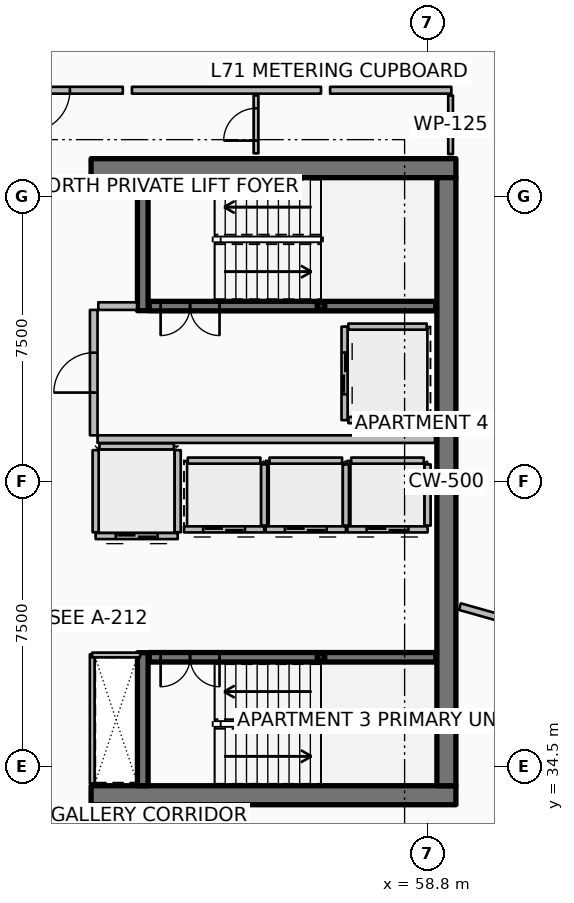
"""IFC4 building model, lengths in metres.
Left out: names, types, materials, properties, quantities, classifications, styles, units other than length and angle.
Written with IfcOpenShell. Run it as: python <this file> out.ifc"""

import sys

from ifc_helpers import new_model, si_unit, direction, frame, frame_2d, origin, origin_2d, place, context, subcontext, project, spatial, rectangle, hollow_rectangle, extrude, element, fill, save


model = new_model("IFC4")
c1 = context("Model", 3, precision=1e-05, world=origin(), true_north=direction((0.0, 1.0)))
c2 = subcontext(c1, "Body", "Model", "MODEL_VIEW")
j1 = project(units=[si_unit("LENGTHUNIT", "METRE"), si_unit("PLANEANGLEUNIT", "RADIAN")], contexts=[c1])
p1 = place(None, origin())
s1 = spatial("IfcSite", under=j1, at=p1, CompositionType="ELEMENT")
p2 = place(p1, origin())
s2 = spatial("IfcBuilding", under=s1, at=p2, CompositionType="ELEMENT")
p3 = place(p2, frame((0.0, 0.0, 282.9)))
s3 = spatial("IfcBuildingStorey", under=s2, at=p3, CompositionType="ELEMENT", Elevation=282.9)
for number, where, z_axis, x_axis in (
    (1, (49.95, 33.75, 0.0), (0.0, 0.0, 1.0), (1.0, 0.0, 0.0)),
    (2, (49.95, 50.25, 0.0), (0.0, 0.0, 1.0), (1.0, 0.0, 0.0)),
):
    element("IfcWall", number, at=place(p3, frame(where, z_axis=z_axis, x_axis=x_axis)), inside=s3, PredefinedType="SHEAR", context=c2, shape_type="SweptSolid", body=[
        extrude(rectangle(XDim=9.6, YDim=0.5, at=frame_2d((4.8, 0.0))), origin(), (0.0, 0.0, 1.0), 3.85),
    ])
p4 = place(p3, frame((59.3, 34.0, 0.0), z_axis=(0.0, 0.0, 1.0), x_axis=(0.0, 1.0, 0.0)))
e3 = element("IfcWall", 3, at=p4, inside=s3, PredefinedType="SHEAR", context=c2, shape_type="SweptSolid", body=[
    extrude(rectangle(XDim=16.0, YDim=0.5, at=frame_2d((8.0, 0.0))), origin(), (0.0, 0.0, 1.0), 3.85),
])
for number, where, z_axis, x_axis in (
    (4, (51.31, 46.5, 0.0), (0.0, 0.0, 1.0), (0.0, 1.0, 0.0)),
    (5, (51.31, 34.0, 0.0), (0.0, 0.0, 1.0), (0.0, 1.0, 0.0)),
):
    element("IfcWall", number, at=place(p3, frame(where, z_axis=z_axis, x_axis=x_axis)), inside=s3, PredefinedType="SHEAR", context=c2, shape_type="SweptSolid", body=[
        extrude(rectangle(XDim=3.5, YDim=0.28, at=frame_2d((1.75, 0.0))), origin(), (0.0, 0.0, 1.0), 3.85),
    ])
for number, where, z_axis, x_axis in (
    (6, (56.0, 46.62, 0.0), (0.0, 0.0, 1.0), (1.0, 0.0, 0.0)),
    (7, (56.0, 37.38, 0.0), (0.0, 0.0, 1.0), (1.0, 0.0, 0.0)),
):
    element("IfcColumn", number, at=place(p3, frame(where, z_axis=z_axis, x_axis=x_axis)), inside=s3, PredefinedType="COLUMN", context=c2, shape_type="SweptSolid", body=[
        extrude(hollow_rectangle(XDim=0.2, YDim=0.2, WallThickness=0.01, InnerFilletRadius=0.01, OuterFilletRadius=0.02, at=origin_2d()), origin(), (0.0, 0.0, 1.0), 1.72),
    ])
p5 = place(p3, frame((51.48, 46.62, 0.0), z_axis=(0.0, 0.0, 1.0), x_axis=(1.0, 0.0, 0.0)))
e8 = element("IfcWall", 8, at=p5, inside=s3, PredefinedType="SOLIDWALL", context=c2, shape_type="SweptSolid", body=[
    extrude(rectangle(XDim=7.54, YDim=0.25, at=frame_2d((3.77, 0.0))), origin(), (0.0, 0.0, 1.0), 3.59),
])
p6 = place(p5, frame((0.3, 0.0, 0.0)))
e9 = element("IfcOpeningElement", 9, at=p6, cuts=e8, PredefinedType="OPENING", context=c2, shape_type="SweptSolid", body=[
    extrude(rectangle(XDim=1.55, YDim=2.15, at=frame_2d((0.775, 1.075))), frame((0.0, 0.135, 0.0), z_axis=(0.0, -1.0, 0.0), x_axis=(1.0, 0.0, 0.0)), (0.0, 0.0, 1.0), 0.27),
])
p7 = place(p3, frame((51.48, 37.38, 0.0), z_axis=(0.0, 0.0, 1.0), x_axis=(1.0, 0.0, 0.0)))
e10 = element("IfcWall", 10, at=p7, inside=s3, PredefinedType="SOLIDWALL", context=c2, shape_type="SweptSolid", body=[
    extrude(rectangle(XDim=7.54, YDim=0.25, at=frame_2d((3.77, 0.0))), origin(), (0.0, 0.0, 1.0), 3.59),
])
p8 = place(p7, frame((0.3, 0.0, 0.0)))
e11 = element("IfcOpeningElement", 11, at=p8, cuts=e10, PredefinedType="OPENING", context=c2, shape_type="SweptSolid", body=[
    extrude(rectangle(XDim=1.55, YDim=2.15, at=frame_2d((0.775, 1.075))), frame((0.0, 0.135, 0.0), z_axis=(0.0, -1.0, 0.0), x_axis=(1.0, 0.0, 0.0)), (0.0, 0.0, 1.0), 0.27),
])
p9 = place(p3, frame((54.505, 40.745, 0.0), z_axis=(0.0, 0.0, 1.0), x_axis=(-1.0, 0.0, 0.0)))
e12 = element("IfcWall", 12, at=p9, inside=s3, PredefinedType="PARTITIONING", context=c2, shape_type="SweptSolid", body=[
    extrude(rectangle(XDim=2.11, YDim=0.16, at=frame_2d((1.055, 0.0))), origin(), (0.0, 0.0, 1.0), 3.59),
])
p10 = place(p9, frame((0.505, 0.0, 0.0)))
e13 = element("IfcOpeningElement", 13, at=p10, cuts=e12, PredefinedType="OPENING", context=c2, shape_type="SweptSolid", body=[
    extrude(rectangle(XDim=1.1, YDim=2.1, at=frame_2d((0.55, 1.05))), frame((0.0, 0.09, 0.0), z_axis=(0.0, -1.0, 0.0), x_axis=(1.0, 0.0, 0.0)), (0.0, 0.0, 1.0), 0.18),
])
p11 = place(p3, frame((54.505, 40.845, 0.0), z_axis=(0.0, 0.0, 1.0), x_axis=(0.0, 1.0, 0.0)))
e14 = element("IfcWall", 14, at=p11, inside=s3, PredefinedType="PARTITIONING", context=c2, shape_type="SweptSolid", body=[
    extrude(rectangle(XDim=1.61, YDim=0.16, at=frame_2d((0.805, 0.0))), origin(), (0.0, 0.0, 1.0), 3.59),
])
p12 = place(p3, frame((52.495, 42.555, 0.0), z_axis=(0.0, 0.0, 1.0), x_axis=(1.0, 0.0, 0.0)))
e15 = element("IfcWall", 15, at=p12, inside=s3, PredefinedType="PARTITIONING", context=c2, shape_type="SweptSolid", body=[
    extrude(rectangle(XDim=1.91, YDim=0.16, at=frame_2d((0.955, 0.0))), origin(), (0.0, 0.0, 1.0), 3.59),
])
p13 = place(p3, frame((56.655, 40.745, 0.0), z_axis=(0.0, 0.0, 1.0), x_axis=(-1.0, 0.0, 0.0)))
e16 = element("IfcWall", 16, at=p13, inside=s3, PredefinedType="PARTITIONING", context=c2, shape_type="SweptSolid", body=[
    extrude(rectangle(XDim=2.11, YDim=0.16, at=frame_2d((1.055, 0.0))), origin(), (0.0, 0.0, 1.0), 3.59),
])
p14 = place(p13, frame((0.505, 0.0, 0.0)))
e17 = element("IfcOpeningElement", 17, at=p14, cuts=e16, PredefinedType="OPENING", context=c2, shape_type="SweptSolid", body=[
    extrude(rectangle(XDim=1.1, YDim=2.1, at=frame_2d((0.55, 1.05))), frame((0.0, 0.09, 0.0), z_axis=(0.0, -1.0, 0.0), x_axis=(1.0, 0.0, 0.0)), (0.0, 0.0, 1.0), 0.18),
])
p15 = place(p3, frame((56.655, 40.845, 0.0), z_axis=(0.0, 0.0, 1.0), x_axis=(0.0, 1.0, 0.0)))
e18 = element("IfcWall", 18, at=p15, inside=s3, PredefinedType="PARTITIONING", context=c2, shape_type="SweptSolid", body=[
    extrude(rectangle(XDim=1.61, YDim=0.16, at=frame_2d((0.805, 0.0))), origin(), (0.0, 0.0, 1.0), 3.59),
])
p16 = place(p3, frame((54.645, 42.555, 0.0), z_axis=(0.0, 0.0, 1.0), x_axis=(1.0, 0.0, 0.0)))
e19 = element("IfcWall", 19, at=p16, inside=s3, PredefinedType="PARTITIONING", context=c2, shape_type="SweptSolid", body=[
    extrude(rectangle(XDim=1.91, YDim=0.16, at=frame_2d((0.955, 0.0))), origin(), (0.0, 0.0, 1.0), 3.59),
])
p17 = place(p3, frame((58.805, 40.745, 0.0), z_axis=(0.0, 0.0, 1.0), x_axis=(-1.0, 0.0, 0.0)))
e20 = element("IfcWall", 20, at=p17, inside=s3, PredefinedType="PARTITIONING", context=c2, shape_type="SweptSolid", body=[
    extrude(rectangle(XDim=2.11, YDim=0.16, at=frame_2d((1.055, 0.0))), origin(), (0.0, 0.0, 1.0), 3.59),
])
p18 = place(p17, frame((0.505, 0.0, 0.0)))
e21 = element("IfcOpeningElement", 21, at=p18, cuts=e20, PredefinedType="OPENING", context=c2, shape_type="SweptSolid", body=[
    extrude(rectangle(XDim=1.1, YDim=2.1, at=frame_2d((0.55, 1.05))), frame((0.0, 0.09, 0.0), z_axis=(0.0, -1.0, 0.0), x_axis=(1.0, 0.0, 0.0)), (0.0, 0.0, 1.0), 0.18),
])
p19 = place(p3, frame((58.805, 40.845, 0.0), z_axis=(0.0, 0.0, 1.0), x_axis=(0.0, 1.0, 0.0)))
e22 = element("IfcWall", 22, at=p19, inside=s3, PredefinedType="PARTITIONING", context=c2, shape_type="SweptSolid", body=[
    extrude(rectangle(XDim=1.61, YDim=0.16, at=frame_2d((0.805, 0.0))), origin(), (0.0, 0.0, 1.0), 3.59),
])
p20 = place(p3, frame((56.795, 42.555, 0.0), z_axis=(0.0, 0.0, 1.0), x_axis=(1.0, 0.0, 0.0)))
e23 = element("IfcWall", 23, at=p20, inside=s3, PredefinedType="PARTITIONING", context=c2, shape_type="SweptSolid", body=[
    extrude(rectangle(XDim=1.91, YDim=0.16, at=frame_2d((0.955, 0.0))), origin(), (0.0, 0.0, 1.0), 3.59),
])
p21 = place(p3, frame((56.62, 46.08, 0.0), z_axis=(0.0, 0.0, 1.0), x_axis=(0.0, -1.0, 0.0)))
e24 = element("IfcWall", 24, at=p21, inside=s3, PredefinedType="PARTITIONING", context=c2, shape_type="SweptSolid", body=[
    extrude(rectangle(XDim=2.46, YDim=0.16, at=frame_2d((1.23, 0.0))), origin(), (0.0, 0.0, 1.0), 3.59),
])
p22 = place(p21, frame((0.68, 0.0, 0.0)))
e25 = element("IfcOpeningElement", 25, at=p22, cuts=e24, PredefinedType="OPENING", context=c2, shape_type="SweptSolid", body=[
    extrude(rectangle(XDim=1.1, YDim=2.1, at=frame_2d((0.55, 1.05))), frame((0.0, 0.09, 0.0), z_axis=(0.0, -1.0, 0.0), x_axis=(1.0, 0.0, 0.0)), (0.0, 0.0, 1.0), 0.18),
])
for number, where, z_axis, x_axis in (
    (26, (56.72, 46.08, 0.0), (0.0, 0.0, 1.0), (1.0, 0.0, 0.0)),
    (27, (56.72, 43.62, 0.0), (0.0, 0.0, 1.0), (1.0, 0.0, 0.0)),
):
    element("IfcWall", number, at=place(p3, frame(where, z_axis=z_axis, x_axis=x_axis)), inside=s3, PredefinedType="PARTITIONING", context=c2, shape_type="SweptSolid", body=[
        extrude(rectangle(XDim=2.06, YDim=0.16, at=frame_2d((1.03, 0.0))), origin(), (0.0, 0.0, 1.0), 3.59),
    ])
p23 = place(p3, frame((52.23, 40.57, 0.0), z_axis=(0.0, 0.0, 1.0), x_axis=(-1.0, 0.0, 0.0)))
e28 = element("IfcWall", 28, at=p23, inside=s3, PredefinedType="PARTITIONING", context=c2, shape_type="SweptSolid", body=[
    extrude(rectangle(XDim=2.16, YDim=0.16, at=frame_2d((1.08, 0.0))), origin(), (0.0, 0.0, 1.0), 3.59),
])
p24 = place(p23, frame((0.53, 0.0, 0.0)))
e29 = element("IfcOpeningElement", 29, at=p24, cuts=e28, PredefinedType="OPENING", context=c2, shape_type="SweptSolid", body=[
    extrude(rectangle(XDim=1.1, YDim=2.1, at=frame_2d((0.55, 1.05))), frame((0.0, 0.09, 0.0), z_axis=(0.0, -1.0, 0.0), x_axis=(1.0, 0.0, 0.0)), (0.0, 0.0, 1.0), 0.18),
])
for number, where, z_axis, x_axis in (
    (30, (52.23, 40.67, 0.0), (0.0, 0.0, 1.0), (0.0, 1.0, 0.0)),
    (31, (50.07, 40.67, 0.0), (0.0, 0.0, 1.0), (0.0, 1.0, 0.0)),
):
    element("IfcWall", number, at=place(p3, frame(where, z_axis=z_axis, x_axis=x_axis)), inside=s3, PredefinedType="PARTITIONING", context=c2, shape_type="SweptSolid", body=[
        extrude(rectangle(XDim=2.16, YDim=0.16, at=frame_2d((1.08, 0.0))), origin(), (0.0, 0.0, 1.0), 3.59),
    ])
p25 = place(p3, frame((50.17, 42.93, 0.0), z_axis=(0.0, 0.0, 1.0), x_axis=(1.0, 0.0, 0.0)))
e32 = element("IfcWall", 32, at=p25, inside=s3, PredefinedType="PARTITIONING", context=c2, shape_type="SweptSolid", body=[
    extrude(rectangle(XDim=1.96, YDim=0.16, at=frame_2d((0.98, 0.0))), origin(), (0.0, 0.0, 1.0), 3.59),
])
p26 = place(p3, frame((50.12, 43.12, 0.0), z_axis=(0.0, 0.0, 1.0), x_axis=(1.0, 0.0, 0.0)))
e33 = element("IfcWall", 33, at=p26, inside=s3, PredefinedType="PARTITIONING", context=c2, shape_type="SweptSolid", body=[
    extrude(rectangle(XDim=8.88, YDim=0.2, at=frame_2d((4.44, 0.0))), origin(), (0.0, 0.0, 1.0), 3.59),
])
p27 = place(p3, frame((50.14, 46.62, 0.0), z_axis=(0.0, 0.0, 1.0), x_axis=(1.0, 0.0, 0.0)))
e34 = element("IfcWall", 34, at=p27, inside=s3, PredefinedType="PARTITIONING", context=c2, shape_type="SweptSolid", body=[
    extrude(rectangle(XDim=1.02, YDim=0.2, at=frame_2d((0.51, 0.0))), origin(), (0.0, 0.0, 1.0), 3.59),
])
p28 = place(p3, frame((50.02, 43.22, 0.0), z_axis=(0.0, 0.0, 1.0), x_axis=(0.0, 1.0, 0.0)))
e35 = element("IfcWall", 35, at=p28, inside=s3, PredefinedType="PARTITIONING", context=c2, shape_type="SweptSolid", body=[
    extrude(rectangle(XDim=3.3, YDim=0.2, at=frame_2d((1.65, 0.0))), origin(), (0.0, 0.0, 1.0), 3.59),
])
p29 = place(p28, frame((1.125, 0.0, 0.0)))
e36 = element("IfcOpeningElement", 36, at=p29, cuts=e35, PredefinedType="OPENING", context=c2, shape_type="SweptSolid", body=[
    extrude(rectangle(XDim=1.05, YDim=2.1, at=frame_2d((0.525, 1.05))), frame((0.0, 0.11, 0.0), z_axis=(0.0, -1.0, 0.0), x_axis=(1.0, 0.0, 0.0)), (0.0, 0.0, 1.0), 0.22),
])
p30 = place(p3, frame((49.98, 34.06, 0.0), z_axis=(0.0, 0.0, 1.0), x_axis=(0.0, 1.0, 0.0)))
e37 = element("IfcWall", 37, at=p30, inside=s3, PredefinedType="PARTITIONING", context=c2, shape_type="SweptSolid", body=[
    extrude(rectangle(XDim=3.4, YDim=0.125, at=frame_2d((1.7, 0.0))), origin(), (0.0, 0.0, 1.0), 3.03),
])
p31 = place(p3, frame((49.98, 37.44, 0.0), z_axis=(0.0, 0.0, 1.0), x_axis=(1.0, 0.0, 0.0)))
e38 = element("IfcWall", 38, at=p31, inside=s3, PredefinedType="PARTITIONING", context=c2, shape_type="SweptSolid", body=[
    extrude(rectangle(XDim=1.26, YDim=0.125, at=frame_2d((0.63, 0.0))), origin(), (0.0, 0.0, 1.0), 3.03),
])
p32 = place(p3, frame((59.41, 50.62, 0.0), z_axis=(0.0, 0.0, 1.0), x_axis=(0.0, 1.0, 0.0)))
e39 = element("IfcWall", 39, at=p32, inside=s3, PredefinedType="PARTITIONING", context=c2, shape_type="SweptSolid", body=[
    extrude(rectangle(XDim=1.54, YDim=0.125, at=frame_2d((0.77, 0.0))), origin(), (0.0, 0.0, 1.0), 3.03),
])
p33 = place(p3, frame((54.29, 50.64, 0.0), z_axis=(0.0, 0.0, 1.0), x_axis=(0.0, 1.0, 0.0)))
e40 = element("IfcWall", 40, at=p33, inside=s3, PredefinedType="PARTITIONING", context=c2, shape_type="SweptSolid", body=[
    extrude(rectangle(XDim=1.52, YDim=0.125, at=frame_2d((0.76, 0.0))), origin(), (0.0, 0.0, 1.0), 3.03),
])
p34 = place(p33, frame((0.335, 0.0, 0.0)))
e41 = element("IfcOpeningElement", 41, at=p34, cuts=e40, PredefinedType="OPENING", context=c2, shape_type="SweptSolid", body=[
    extrude(rectangle(XDim=0.85, YDim=2.06, at=frame_2d((0.425, 1.03))), frame((0.0, 0.073, 0.0), z_axis=(0.0, -1.0, 0.0), x_axis=(1.0, 0.0, 0.0)), (0.0, 0.0, 1.0), 0.145),
])
p35 = place(p3, frame((59.656, 38.713, 0.0), z_axis=(0.0, 0.0, 1.0), x_axis=(0.962454756022, -0.27144215334, 0.0)))
e42 = element("IfcWall", 42, at=p35, inside=s3, PredefinedType="PARTITIONING", context=c2, shape_type="SweptSolid", body=[
    extrude(rectangle(XDim=17.385, YDim=0.18, at=frame_2d((8.692, 0.0))), origin(), (0.0, 0.0, 1.0), 2.957),
])
p36 = place(p3, frame((50.785, 52.3, 0.0), z_axis=(0.0, 0.0, 1.0), x_axis=(-1.0, 0.0, 0.0)))
e43 = element("IfcWall", 43, at=p36, inside=s3, PredefinedType="PARTITIONING", context=c2, shape_type="SweptSolid", body=[
    extrude(rectangle(XDim=3.884, YDim=0.18, at=frame_2d((1.942, 0.0))), origin(), (0.0, 0.0, 1.0), 2.957),
])
p37 = place(p36, frame((1.392, 0.0, 0.0)))
e44 = element("IfcOpeningElement", 44, at=p37, cuts=e43, PredefinedType="OPENING", context=c2, shape_type="SweptSolid", body=[
    extrude(rectangle(XDim=1.1, YDim=2.1, at=frame_2d((0.55, 1.05))), frame((0.0, 0.1, 0.0), z_axis=(0.0, -1.0, 0.0), x_axis=(1.0, 0.0, 0.0)), (0.0, 0.0, 1.0), 0.2),
])
p38 = place(p3, frame((59.43, 52.3, 0.0), z_axis=(0.0, 0.0, 1.0), x_axis=(-1.0, 0.0, 0.0)))
e45 = element("IfcWall", 45, at=p38, inside=s3, PredefinedType="PARTITIONING", context=c2, shape_type="SweptSolid", body=[
    extrude(rectangle(XDim=3.19, YDim=0.18, at=frame_2d((1.595, 0.0))), origin(), (0.0, 0.0, 1.0), 2.957),
])
p39 = place(p3, frame((56.0, 52.3, 0.0), z_axis=(0.0, 0.0, 1.0), x_axis=(-1.0, 0.0, 0.0)))
e46 = element("IfcWall", 46, at=p39, inside=s3, PredefinedType="PARTITIONING", context=c2, shape_type="SweptSolid", body=[
    extrude(rectangle(XDim=4.975, YDim=0.18, at=frame_2d((2.488, 0.0))), origin(), (0.0, 0.0, 1.0), 2.957),
])
p40 = place(p6, origin())
e47 = element("IfcDoor", 47, at=p40, inside=s3, OperationType="DOUBLE_DOOR_SINGLE_SWING", PredefinedType="DOOR", context=c2, shape_type="SweptSolid", body=[
    extrude(rectangle(XDim=1.55, YDim=2.15, at=frame_2d((0.775, 1.075))), frame((0.0, 0.025, 0.0), z_axis=(0.0, -1.0, 0.0), x_axis=(1.0, 0.0, 0.0)), (0.0, 0.0, 1.0), 0.05),
])
fill(e9, e47)
p41 = place(p8, origin())
e48 = element("IfcDoor", 48, at=p41, inside=s3, OperationType="DOUBLE_DOOR_SINGLE_SWING", PredefinedType="DOOR", context=c2, shape_type="SweptSolid", body=[
    extrude(rectangle(XDim=1.55, YDim=2.15, at=frame_2d((0.775, 1.075))), frame((0.0, 0.025, 0.0), z_axis=(0.0, -1.0, 0.0), x_axis=(1.0, 0.0, 0.0)), (0.0, 0.0, 1.0), 0.05),
])
fill(e11, e48)
p42 = place(p10, origin())
e49 = element("IfcDoor", 49, at=p42, inside=s3, OperationType="DOUBLE_DOOR_SLIDING", PredefinedType="DOOR", context=c2, shape_type="SweptSolid", body=[
    extrude(rectangle(XDim=1.1, YDim=2.1, at=frame_2d((0.55, 1.05))), frame((0.0, 0.025, 0.0), z_axis=(0.0, -1.0, 0.0), x_axis=(1.0, 0.0, 0.0)), (0.0, 0.0, 1.0), 0.05),
])
fill(e13, e49)
p43 = place(p14, origin())
e50 = element("IfcDoor", 50, at=p43, inside=s3, OperationType="DOUBLE_DOOR_SLIDING", PredefinedType="DOOR", context=c2, shape_type="SweptSolid", body=[
    extrude(rectangle(XDim=1.1, YDim=2.1, at=frame_2d((0.55, 1.05))), frame((0.0, 0.025, 0.0), z_axis=(0.0, -1.0, 0.0), x_axis=(1.0, 0.0, 0.0)), (0.0, 0.0, 1.0), 0.05),
])
fill(e17, e50)
p44 = place(p18, origin())
e51 = element("IfcDoor", 51, at=p44, inside=s3, OperationType="DOUBLE_DOOR_SLIDING", PredefinedType="DOOR", context=c2, shape_type="SweptSolid", body=[
    extrude(rectangle(XDim=1.1, YDim=2.1, at=frame_2d((0.55, 1.05))), frame((0.0, 0.025, 0.0), z_axis=(0.0, -1.0, 0.0), x_axis=(1.0, 0.0, 0.0)), (0.0, 0.0, 1.0), 0.05),
])
fill(e21, e51)
p45 = place(p22, origin())
e52 = element("IfcDoor", 52, at=p45, inside=s3, OperationType="DOUBLE_DOOR_SLIDING", PredefinedType="DOOR", context=c2, shape_type="SweptSolid", body=[
    extrude(rectangle(XDim=1.1, YDim=2.1, at=frame_2d((0.55, 1.05))), frame((0.0, 0.025, 0.0), z_axis=(0.0, -1.0, 0.0), x_axis=(1.0, 0.0, 0.0)), (0.0, 0.0, 1.0), 0.05),
])
fill(e25, e52)
p46 = place(p24, origin())
e53 = element("IfcDoor", 53, at=p46, inside=s3, OperationType="DOUBLE_DOOR_SLIDING", PredefinedType="DOOR", context=c2, shape_type="SweptSolid", body=[
    extrude(rectangle(XDim=1.1, YDim=2.1, at=frame_2d((0.55, 1.05))), frame((0.0, 0.025, 0.0), z_axis=(0.0, -1.0, 0.0), x_axis=(1.0, 0.0, 0.0)), (0.0, 0.0, 1.0), 0.05),
])
fill(e29, e53)
p47 = place(p29, origin())
e54 = element("IfcDoor", 54, at=p47, inside=s3, OperationType="SINGLE_SWING_LEFT", PredefinedType="DOOR", context=c2, shape_type="SweptSolid", body=[
    extrude(rectangle(XDim=1.05, YDim=2.1, at=frame_2d((0.525, 1.05))), frame((0.0, 0.025, 0.0), z_axis=(0.0, -1.0, 0.0), x_axis=(1.0, 0.0, 0.0)), (0.0, 0.0, 1.0), 0.05),
])
fill(e36, e54)
p48 = place(p34, origin())
e55 = element("IfcDoor", 55, at=p48, inside=s3, OperationType="SINGLE_SWING_LEFT", PredefinedType="DOOR", context=c2, shape_type="SweptSolid", body=[
    extrude(rectangle(XDim=0.85, YDim=2.06, at=frame_2d((0.425, 1.03))), frame((0.0, 0.025, 0.0), z_axis=(0.0, -1.0, 0.0), x_axis=(1.0, 0.0, 0.0)), (0.0, 0.0, 1.0), 0.05),
])
fill(e41, e55)
p49 = place(p37, origin())
e56 = element("IfcDoor", 56, at=p49, inside=s3, OperationType="SINGLE_SWING_RIGHT", PredefinedType="DOOR", context=c2, shape_type="SweptSolid", body=[
    extrude(rectangle(XDim=1.1, YDim=2.1, at=frame_2d((0.55, 1.05))), frame((0.0, 0.025, 0.0), z_axis=(0.0, -1.0, 0.0), x_axis=(1.0, 0.0, 0.0)), (0.0, 0.0, 1.0), 0.05),
])
fill(e44, e56)
save(model, sys.argv[1])
